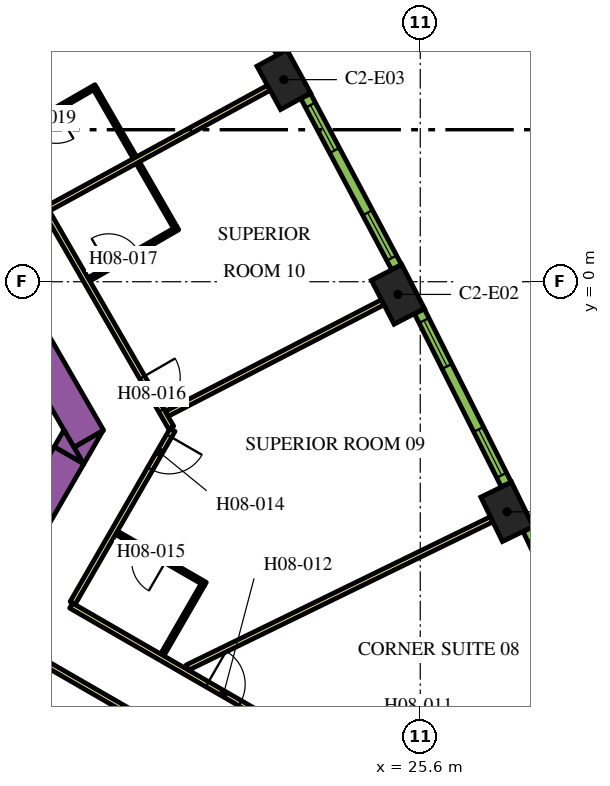
"""IFC4 building model, lengths in metres.
Left out: names, types, materials, properties, quantities, classifications, styles, units other than length and angle.
Written with IfcOpenShell. Run it as: python <this file> out.ifc"""

import sys

from ifc_helpers import new_model, si_unit, direction, frame, frame_2d, origin, origin_2d, place, context, subcontext, project, spatial, polyline, rectangle, outline, extrude, element, fill, save


model = new_model("IFC4")
c1 = context("Model", 3, precision=1e-05, world=origin(), true_north=direction((0.0, 1.0)))
c2 = subcontext(c1, "Body", "Model", "MODEL_VIEW")
j1 = project(units=[si_unit("LENGTHUNIT", "METRE"), si_unit("PLANEANGLEUNIT", "RADIAN")], contexts=[c1])
p1 = place(None, origin())
s1 = spatial("IfcSite", under=j1, at=p1, CompositionType="ELEMENT")
p2 = place(p1, origin())
s2 = spatial("IfcBuilding", under=s1, at=p2, CompositionType="ELEMENT")
p3 = place(p2, frame((0.0, 0.0, 111.0)))
s3 = spatial("IfcBuildingStorey", under=s2, at=p3, CompositionType="ELEMENT", Elevation=111.0)
for number, where, z_axis, x_axis in (
    (1, (27.883, -6.054, 0.0), (0.0, 0.0, 1.0), (-0.438, 0.899, 0.0)),
    (2, (25.012, -0.334, 0.0), (0.0, 0.0, 1.0), (-0.459, 0.888, 0.0)),
    (3, (22.009, 5.317, 0.0), (0.0, 0.0, 1.0), (-0.48, 0.877, 0.0)),
):
    element("IfcColumn", number, at=place(p3, frame(where, z_axis=z_axis, x_axis=x_axis)), inside=s3, PredefinedType="COLUMN", context=c2, shape_type="SweptSolid", body=[
        extrude(rectangle(XDim=1.3, YDim=0.9, at=origin_2d()), origin(), (0.0, 0.0, 1.0), 3.9),
    ])
p4 = place(p3, frame((6.711, 13.476, 0.0), z_axis=(0.0, 0.0, 1.0), x_axis=(0.500002723396, -0.866023831425, 0.0)))
e4 = element("IfcWall", 4, at=p4, inside=s3, PredefinedType="SOLIDWALL", context=c2, shape_type="SweptSolid", body=[
    extrude(rectangle(XDim=20.334, YDim=0.9, at=frame_2d((10.167, 0.0))), origin(), (0.0, 0.0, 1.0), 3.9),
])
p5 = place(p3, origin())
e5 = element("IfcWall", 5, at=p5, inside=s3, PredefinedType="SOLIDWALL", context=c2, shape_type="SweptSolid", body=[
    extrude(outline(polyline([(16.743, -4.8), (16.489, -4.36), (17.251, -3.92), (16.743, -4.8)])), origin(), (0.0, 0.0, 1.0), 3.9),
])
p6 = place(p3, frame((11.695, -12.644, 0.0), z_axis=(0.0, 0.0, 1.0), x_axis=(0.500010229568, 0.86601949766, 0.0)))
e6 = element("IfcWall", 6, at=p6, inside=s3, PredefinedType="SOLIDWALL", context=c2, shape_type="SweptSolid", body=[
    extrude(rectangle(XDim=9.326, YDim=0.9, at=frame_2d((4.663, 0.0))), origin(), (0.0, 0.0, 1.0), 3.9),
])
e7 = element("IfcWall", 7, at=p5, inside=s3, PredefinedType="SOLIDWALL", context=c2, shape_type="SweptSolid", body=[
    extrude(outline(polyline([(16.223, -3.9), (16.732, -4.78), (15.969, -4.34), (16.223, -3.9)])), origin(), (0.0, 0.0, 1.0), 3.9),
])
p7 = place(p3, frame((16.412, -8.523, 0.0), z_axis=(0.0, 0.0, 1.0), x_axis=(0.866025629663, -0.499999608766, 0.0)))
e8 = element("IfcWall", 8, at=p7, inside=s3, PredefinedType="PARTITIONING", context=c2, shape_type="SweptSolid", body=[
    extrude(rectangle(XDim=13.624, YDim=0.15, at=frame_2d((6.812, 0.0))), origin(), (0.0, 0.0, 1.0), 2.75),
])
p8 = place(p7, frame((4.134, 0.0, 0.0)))
e9 = element("IfcOpeningElement", 9, at=p8, cuts=e8, PredefinedType="OPENING", context=c2, shape_type="SweptSolid", body=[
    extrude(rectangle(XDim=1.0, YDim=2.1, at=frame_2d((0.5, 1.05))), frame((0.0, 0.085, 0.0), z_axis=(0.0, -1.0, 0.0), x_axis=(1.0, 0.0, 0.0)), (0.0, 0.0, 1.0), 0.17),
])
p9 = place(p3, frame((19.081, -3.9, 0.0), z_axis=(0.0, 0.0, 1.0), x_axis=(-0.499974327079, -0.866040225545, 0.0)))
e10 = element("IfcWall", 10, at=p9, inside=s3, PredefinedType="PARTITIONING", context=c2, shape_type="SweptSolid", body=[
    extrude(rectangle(XDim=5.258, YDim=0.15, at=frame_2d((2.629, 0.0))), origin(), (0.0, 0.0, 1.0), 2.75),
])
p10 = place(p9, frame((0.18, 0.0, 0.0)))
e11 = element("IfcOpeningElement", 11, at=p10, cuts=e10, PredefinedType="OPENING", context=c2, shape_type="SweptSolid", body=[
    extrude(rectangle(XDim=1.0, YDim=2.1, at=frame_2d((0.5, 1.05))), frame((0.0, 0.085, 0.0), z_axis=(0.0, -1.0, 0.0), x_axis=(1.0, 0.0, 0.0)), (0.0, 0.0, 1.0), 0.17),
])
p11 = place(p3, frame((6.163, 18.475, 0.0), z_axis=(0.0, 0.0, 1.0), x_axis=(0.500001317485, -0.866024643133, 0.0)))
e12 = element("IfcWall", 12, at=p11, inside=s3, PredefinedType="PARTITIONING", context=c2, shape_type="SweptSolid", body=[
    extrude(rectangle(XDim=25.767, YDim=0.15, at=frame_2d((12.883, 0.0))), origin(), (0.0, 0.0, 1.0), 2.75),
])
p12 = place(p11, frame((24.241, 0.0, 0.0)))
e13 = element("IfcOpeningElement", 13, at=p12, cuts=e12, PredefinedType="OPENING", context=c2, shape_type="SweptSolid", body=[
    extrude(rectangle(XDim=1.0, YDim=2.1, at=frame_2d((0.5, 1.05))), frame((0.0, 0.085, 0.0), z_axis=(0.0, -1.0, 0.0), x_axis=(1.0, 0.0, 0.0)), (0.0, 0.0, 1.0), 0.17),
])
p13 = place(p11, frame((13.144, 0.0, 0.0)))
e14 = element("IfcOpeningElement", 14, at=p13, cuts=e12, PredefinedType="OPENING", context=c2, shape_type="SweptSolid", body=[
    extrude(rectangle(XDim=1.0, YDim=2.1, at=frame_2d((0.5, 1.05))), frame((0.0, 0.085, 0.0), z_axis=(0.0, -1.0, 0.0), x_axis=(1.0, 0.0, 0.0)), (0.0, 0.0, 1.0), 0.17),
])
p14 = place(p11, frame((10.874, 0.0, 0.0)))
e15 = element("IfcOpeningElement", 15, at=p14, cuts=e12, PredefinedType="OPENING", context=c2, shape_type="SweptSolid", body=[
    extrude(rectangle(XDim=0.9, YDim=2.1, at=frame_2d((0.45, 1.05))), frame((0.0, 0.085, 0.0), z_axis=(0.0, -1.0, 0.0), x_axis=(1.0, 0.0, 0.0)), (0.0, 0.0, 1.0), 0.17),
])
p15 = place(p11, frame((3.718, 0.0, 0.0)))
e16 = element("IfcOpeningElement", 16, at=p15, cuts=e12, PredefinedType="OPENING", context=c2, shape_type="SweptSolid", body=[
    extrude(rectangle(XDim=1.0, YDim=2.1, at=frame_2d((0.5, 1.05))), frame((0.0, 0.085, 0.0), z_axis=(0.0, -1.0, 0.0), x_axis=(1.0, 0.0, 0.0)), (0.0, 0.0, 1.0), 0.17),
])
p16 = place(p11, frame((2.411, 0.0, 0.0)))
e17 = element("IfcOpeningElement", 17, at=p16, cuts=e12, PredefinedType="OPENING", context=c2, shape_type="SweptSolid", body=[
    extrude(rectangle(XDim=1.0, YDim=2.1, at=frame_2d((0.5, 1.05))), frame((0.0, 0.085, 0.0), z_axis=(0.0, -1.0, 0.0), x_axis=(1.0, 0.0, 0.0)), (0.0, 0.0, 1.0), 0.17),
])
p17 = place(p3, frame((27.386, -16.764, 0.0), z_axis=(0.0, 0.0, 1.0), x_axis=(-0.866022585856, 0.500004880763, 0.0)))
e18 = element("IfcWall", 18, at=p17, inside=s3, PredefinedType="PARTITIONING", context=c2, shape_type="SweptSolid", body=[
    extrude(rectangle(XDim=13.544, YDim=0.15, at=frame_2d((6.772, 0.0))), origin(), (0.0, 0.0, 1.0), 2.75),
])
p18 = place(p17, frame((9.447, 0.0, 0.0)))
e19 = element("IfcOpeningElement", 19, at=p18, cuts=e18, PredefinedType="OPENING", context=c2, shape_type="SweptSolid", body=[
    extrude(rectangle(XDim=1.0, YDim=2.1, at=frame_2d((0.5, 1.05))), frame((0.0, 0.085, 0.0), z_axis=(0.0, -1.0, 0.0), x_axis=(1.0, 0.0, 0.0)), (0.0, 0.0, 1.0), 0.17),
])
p19 = place(p17, frame((3.926, 0.0, 0.0)))
e20 = element("IfcOpeningElement", 20, at=p19, cuts=e18, PredefinedType="OPENING", context=c2, shape_type="SweptSolid", body=[
    extrude(rectangle(XDim=0.9, YDim=2.1, at=frame_2d((0.45, 1.05))), frame((0.0, 0.085, 0.0), z_axis=(0.0, -1.0, 0.0), x_axis=(1.0, 0.0, 0.0)), (0.0, 0.0, 1.0), 0.17),
])
p20 = place(p3, frame((21.614, 5.102, 0.0), z_axis=(0.0, 0.0, 1.0), x_axis=(-0.877484555087, -0.479604895287, 0.0)))
e21 = element("IfcWall", 21, at=p20, inside=s3, PredefinedType="PARTITIONING", context=c2, shape_type="SweptSolid", body=[
    extrude(rectangle(XDim=6.611, YDim=0.15, at=frame_2d((3.306, 0.0))), origin(), (0.0, 0.0, 1.0), 2.75),
])
p21 = place(p3, frame((24.613, -0.541, 0.0), z_axis=(0.0, 0.0, 1.0), x_axis=(-0.888459912519, -0.458954228487, 0.0)))
e22 = element("IfcWall", 22, at=p21, inside=s3, PredefinedType="PARTITIONING", context=c2, shape_type="SweptSolid", body=[
    extrude(rectangle(XDim=6.392, YDim=0.15, at=frame_2d((3.196, 0.0))), origin(), (0.0, 0.0, 1.0), 2.75),
])
p22 = place(p3, frame((27.478, -6.251, 0.0), z_axis=(0.0, 0.0, 1.0), x_axis=(-0.898940618603, -0.438070501432, 0.0)))
e23 = element("IfcWall", 23, at=p22, inside=s3, PredefinedType="PARTITIONING", context=c2, shape_type="SweptSolid", body=[
    extrude(rectangle(XDim=8.909, YDim=0.15, at=frame_2d((4.455, 0.0))), origin(), (0.0, 0.0, 1.0), 2.75),
])
p23 = place(p3, frame((19.946, -7.953, 0.0), z_axis=(0.0, 0.0, 1.0), x_axis=(-0.86599734893, 0.500048589285, 0.0)))
e24 = element("IfcWall", 24, at=p23, inside=s3, PredefinedType="PARTITIONING", context=c2, shape_type="SweptSolid", body=[
    extrude(rectangle(XDim=2.7, YDim=0.1, at=frame_2d((1.35, 0.0))), origin(), (0.0, 0.0, 1.0), 2.75),
])
p24 = place(p23, frame((1.2, 0.0, 0.0)))
e25 = element("IfcOpeningElement", 25, at=p24, cuts=e24, PredefinedType="OPENING", context=c2, shape_type="SweptSolid", body=[
    extrude(rectangle(XDim=0.9, YDim=2.1, at=frame_2d((0.45, 1.05))), frame((0.0, 0.06, 0.0), z_axis=(0.0, -1.0, 0.0), x_axis=(1.0, 0.0, 0.0)), (0.0, 0.0, 1.0), 0.12),
])
p25 = place(p3, frame((19.877, -7.972, 0.0), z_axis=(0.0, 0.0, 1.0), x_axis=(-0.500010206181, -0.866019511163, 0.0)))
e26 = element("IfcWall", 26, at=p25, inside=s3, PredefinedType="PARTITIONING", context=c2, shape_type="SweptSolid", body=[
    extrude(rectangle(XDim=2.13, YDim=0.1, at=frame_2d((1.065, 0.0))), origin(), (0.0, 0.0, 1.0), 2.75),
])
p26 = place(p3, frame((16.881, 0.061, 0.0), z_axis=(0.0, 0.0, 1.0), x_axis=(0.866019956843, 0.50000943426, 0.0)))
e27 = element("IfcWall", 27, at=p26, inside=s3, PredefinedType="PARTITIONING", context=c2, shape_type="SweptSolid", body=[
    extrude(rectangle(XDim=2.7, YDim=0.1, at=frame_2d((1.35, 0.0))), origin(), (0.0, 0.0, 1.0), 2.75),
])
p27 = place(p26, frame((0.6, 0.0, 0.0)))
e28 = element("IfcOpeningElement", 28, at=p27, cuts=e27, PredefinedType="OPENING", context=c2, shape_type="SweptSolid", body=[
    extrude(rectangle(XDim=0.9, YDim=2.1, at=frame_2d((0.45, 1.05))), frame((0.0, 0.06, 0.0), z_axis=(0.0, -1.0, 0.0), x_axis=(1.0, 0.0, 0.0)), (0.0, 0.0, 1.0), 0.12),
])
p28 = place(p3, frame((19.151, 1.429, 0.0), z_axis=(0.0, 0.0, 1.0), x_axis=(-0.500024377727, 0.866011328839, 0.0)))
e29 = element("IfcWall", 29, at=p28, inside=s3, PredefinedType="PARTITIONING", context=c2, shape_type="SweptSolid", body=[
    extrude(rectangle(XDim=1.96, YDim=0.1, at=frame_2d((0.98, 0.0))), origin(), (0.0, 0.0, 1.0), 2.75),
])
p29 = place(p3, frame((17.066, 5.141, 0.0), z_axis=(0.0, 0.0, 1.0), x_axis=(-0.866059108428, -0.4999416173, 0.0)))
e30 = element("IfcWall", 30, at=p29, inside=s3, PredefinedType="PARTITIONING", context=c2, shape_type="SweptSolid", body=[
    extrude(rectangle(XDim=2.7, YDim=0.1, at=frame_2d((1.35, 0.0))), origin(), (0.0, 0.0, 1.0), 2.75),
])
p30 = place(p29, frame((1.2, 0.0, 0.0)))
e31 = element("IfcOpeningElement", 31, at=p30, cuts=e30, PredefinedType="OPENING", context=c2, shape_type="SweptSolid", body=[
    extrude(rectangle(XDim=0.9, YDim=2.1, at=frame_2d((0.45, 1.05))), frame((0.0, 0.06, 0.0), z_axis=(0.0, -1.0, 0.0), x_axis=(1.0, 0.0, 0.0)), (0.0, 0.0, 1.0), 0.12),
])
p31 = place(p3, frame((17.047, 5.073, 0.0), z_axis=(0.0, 0.0, 1.0), x_axis=(0.500008976872, -0.866020220923, 0.0)))
e32 = element("IfcWall", 32, at=p31, inside=s3, PredefinedType="PARTITIONING", context=c2, shape_type="SweptSolid", body=[
    extrude(rectangle(XDim=2.09, YDim=0.1, at=frame_2d((1.045, 0.0))), origin(), (0.0, 0.0, 1.0), 2.75),
])
p32 = place(p3, frame((30.62, -11.127, 0.0), z_axis=(0.0, 0.0, 1.0), x_axis=(-0.427543726596, 0.903994669148, 0.0)))
e33 = element("IfcWall", 33, at=p32, inside=s3, PredefinedType="SOLIDWALL", context=c2, shape_type="SweptSolid", body=[
    extrude(rectangle(XDim=5.107, YDim=0.29, at=frame_2d((2.553, 0.0))), origin(), (0.0, 0.0, 1.0), 3.65),
])
p33 = place(p32, frame((0.24, 0.0, 0.9)))
e34 = element("IfcOpeningElement", 34, at=p33, cuts=e33, PredefinedType="OPENING", context=c2, shape_type="SweptSolid", body=[
    extrude(rectangle(XDim=1.35, YDim=2.15, at=frame_2d((0.675, 1.075))), frame((0.0, 0.155, 0.0), z_axis=(0.0, -1.0, 0.0), x_axis=(1.0, 0.0, 0.0)), (0.0, 0.0, 1.0), 0.31),
])
p34 = place(p32, frame((3.471, 0.0, 0.9)))
e35 = element("IfcOpeningElement", 35, at=p34, cuts=e33, PredefinedType="OPENING", context=c2, shape_type="SweptSolid", body=[
    extrude(rectangle(XDim=1.35, YDim=2.15, at=frame_2d((0.675, 1.075))), frame((0.0, 0.155, 0.0), z_axis=(0.0, -1.0, 0.0), x_axis=(1.0, 0.0, 0.0)), (0.0, 0.0, 1.0), 0.31),
])
p35 = place(p3, frame((27.864, -5.336, 0.0), z_axis=(0.0, 0.0, 1.0), x_axis=(-0.448534297211, 0.893765620409, 0.0)))
e36 = element("IfcWall", 36, at=p35, inside=s3, PredefinedType="SOLIDWALL", context=c2, shape_type="SweptSolid", body=[
    extrude(rectangle(XDim=5.1, YDim=0.29, at=frame_2d((2.55, 0.0))), origin(), (0.0, 0.0, 1.0), 3.65),
])
p36 = place(p35, frame((0.272, 0.0, 0.9)))
e37 = element("IfcOpeningElement", 37, at=p36, cuts=e36, PredefinedType="OPENING", context=c2, shape_type="SweptSolid", body=[
    extrude(rectangle(XDim=1.35, YDim=2.15, at=frame_2d((0.675, 1.075))), frame((0.0, 0.155, 0.0), z_axis=(0.0, -1.0, 0.0), x_axis=(1.0, 0.0, 0.0)), (0.0, 0.0, 1.0), 0.31),
])
p37 = place(p35, frame((3.478, 0.0, 0.9)))
e38 = element("IfcOpeningElement", 38, at=p37, cuts=e36, PredefinedType="OPENING", context=c2, shape_type="SweptSolid", body=[
    extrude(rectangle(XDim=1.35, YDim=2.15, at=frame_2d((0.675, 1.075))), frame((0.0, 0.155, 0.0), z_axis=(0.0, -1.0, 0.0), x_axis=(1.0, 0.0, 0.0)), (0.0, 0.0, 1.0), 0.31),
])
p38 = place(p3, frame((24.977, 0.383, 0.0), z_axis=(0.0, 0.0, 1.0), x_axis=(-0.469323203119, 0.883026461106, 0.0)))
e39 = element("IfcWall", 39, at=p38, inside=s3, PredefinedType="SOLIDWALL", context=c2, shape_type="SweptSolid", body=[
    extrude(rectangle(XDim=5.101, YDim=0.29, at=frame_2d((2.55, 0.0))), origin(), (0.0, 0.0, 1.0), 3.65),
])
p39 = place(p38, frame((0.273, 0.0, 0.9)))
e40 = element("IfcOpeningElement", 40, at=p39, cuts=e39, PredefinedType="OPENING", context=c2, shape_type="SweptSolid", body=[
    extrude(rectangle(XDim=1.35, YDim=2.15, at=frame_2d((0.675, 1.075))), frame((0.0, 0.155, 0.0), z_axis=(0.0, -1.0, 0.0), x_axis=(1.0, 0.0, 0.0)), (0.0, 0.0, 1.0), 0.31),
])
p40 = place(p38, frame((3.478, 0.0, 0.9)))
e41 = element("IfcOpeningElement", 41, at=p40, cuts=e39, PredefinedType="OPENING", context=c2, shape_type="SweptSolid", body=[
    extrude(rectangle(XDim=1.35, YDim=2.15, at=frame_2d((0.675, 1.075))), frame((0.0, 0.155, 0.0), z_axis=(0.0, -1.0, 0.0), x_axis=(1.0, 0.0, 0.0)), (0.0, 0.0, 1.0), 0.31),
])
p41 = place(p3, frame((21.956, 6.033, 0.0), z_axis=(0.0, 0.0, 1.0), x_axis=(-0.48983164787, 0.87181704316, 0.0)))
e42 = element("IfcWall", 42, at=p41, inside=s3, PredefinedType="SOLIDWALL", context=c2, shape_type="SweptSolid", body=[
    extrude(rectangle(XDim=5.1, YDim=0.29, at=frame_2d((2.55, 0.0))), origin(), (0.0, 0.0, 1.0), 3.65),
])
p42 = place(p41, frame((0.273, 0.0, 0.9)))
e43 = element("IfcOpeningElement", 43, at=p42, cuts=e42, PredefinedType="OPENING", context=c2, shape_type="SweptSolid", body=[
    extrude(rectangle(XDim=1.35, YDim=2.15, at=frame_2d((0.675, 1.075))), frame((0.0, 0.155, 0.0), z_axis=(0.0, -1.0, 0.0), x_axis=(1.0, 0.0, 0.0)), (0.0, 0.0, 1.0), 0.31),
])
p43 = place(p41, frame((3.478, 0.0, 0.9)))
e44 = element("IfcOpeningElement", 44, at=p43, cuts=e42, PredefinedType="OPENING", context=c2, shape_type="SweptSolid", body=[
    extrude(rectangle(XDim=1.35, YDim=2.15, at=frame_2d((0.675, 1.075))), frame((0.0, 0.155, 0.0), z_axis=(0.0, -1.0, 0.0), x_axis=(1.0, 0.0, 0.0)), (0.0, 0.0, 1.0), 0.31),
])
p44 = place(p8, origin())
e45 = element("IfcDoor", 45, at=p44, inside=s3, OperationType="SINGLE_SWING_LEFT", PredefinedType="DOOR", context=c2, shape_type="SweptSolid", body=[
    extrude(rectangle(XDim=1.0, YDim=2.1, at=frame_2d((0.5, 1.05))), frame((0.0, 0.025, 0.0), z_axis=(0.0, -1.0, 0.0), x_axis=(1.0, 0.0, 0.0)), (0.0, 0.0, 1.0), 0.05),
])
fill(e9, e45)
p45 = place(p10, origin())
e46 = element("IfcDoor", 46, at=p45, inside=s3, OperationType="SINGLE_SWING_LEFT", PredefinedType="DOOR", context=c2, shape_type="SweptSolid", body=[
    extrude(rectangle(XDim=1.0, YDim=2.1, at=frame_2d((0.5, 1.05))), frame((0.0, 0.025, 0.0), z_axis=(0.0, -1.0, 0.0), x_axis=(1.0, 0.0, 0.0)), (0.0, 0.0, 1.0), 0.05),
])
fill(e11, e46)
p46 = place(p24, origin())
e47 = element("IfcDoor", 47, at=p46, inside=s3, OperationType="SINGLE_SWING_RIGHT", PredefinedType="DOOR", context=c2, shape_type="SweptSolid", body=[
    extrude(rectangle(XDim=0.9, YDim=2.1, at=frame_2d((0.45, 1.05))), frame((0.0, 0.025, 0.0), z_axis=(0.0, -1.0, 0.0), x_axis=(1.0, 0.0, 0.0)), (0.0, 0.0, 1.0), 0.05),
])
fill(e25, e47)
p47 = place(p12, origin())
e48 = element("IfcDoor", 48, at=p47, inside=s3, OperationType="SINGLE_SWING_RIGHT", PredefinedType="DOOR", context=c2, shape_type="SweptSolid", body=[
    extrude(rectangle(XDim=1.0, YDim=2.1, at=frame_2d((0.5, 1.05))), frame((0.0, 0.025, 0.0), z_axis=(0.0, -1.0, 0.0), x_axis=(1.0, 0.0, 0.0)), (0.0, 0.0, 1.0), 0.05),
])
fill(e13, e48)
p48 = place(p27, origin())
e49 = element("IfcDoor", 49, at=p48, inside=s3, OperationType="SINGLE_SWING_LEFT", PredefinedType="DOOR", context=c2, shape_type="SweptSolid", body=[
    extrude(rectangle(XDim=0.9, YDim=2.1, at=frame_2d((0.45, 1.05))), frame((0.0, 0.025, 0.0), z_axis=(0.0, -1.0, 0.0), x_axis=(1.0, 0.0, 0.0)), (0.0, 0.0, 1.0), 0.05),
])
fill(e28, e49)
p49 = place(p30, origin())
e50 = element("IfcDoor", 50, at=p49, inside=s3, OperationType="SINGLE_SWING_LEFT", PredefinedType="DOOR", context=c2, shape_type="SweptSolid", body=[
    extrude(rectangle(XDim=0.9, YDim=2.1, at=frame_2d((0.45, 1.05))), frame((0.0, 0.025, 0.0), z_axis=(0.0, -1.0, 0.0), x_axis=(1.0, 0.0, 0.0)), (0.0, 0.0, 1.0), 0.05),
])
fill(e31, e50)
p50 = place(p36, origin())
e51 = element("IfcWindow", 51, at=p50, inside=s3, PartitioningType="DOUBLE_PANEL_VERTICAL", PredefinedType="WINDOW", context=c2, shape_type="SweptSolid", body=[
    extrude(rectangle(XDim=1.35, YDim=2.15, at=frame_2d((0.675, 1.075))), frame((0.0, 0.015, 0.0), z_axis=(0.0, -1.0, 0.0), x_axis=(1.0, 0.0, 0.0)), (0.0, 0.0, 1.0), 0.06),
])
fill(e37, e51)
p51 = place(p37, origin())
e52 = element("IfcWindow", 52, at=p51, inside=s3, PartitioningType="DOUBLE_PANEL_VERTICAL", PredefinedType="WINDOW", context=c2, shape_type="SweptSolid", body=[
    extrude(rectangle(XDim=1.35, YDim=2.15, at=frame_2d((0.675, 1.075))), frame((0.0, 0.015, 0.0), z_axis=(0.0, -1.0, 0.0), x_axis=(1.0, 0.0, 0.0)), (0.0, 0.0, 1.0), 0.06),
])
fill(e38, e52)
p52 = place(p39, origin())
e53 = element("IfcWindow", 53, at=p52, inside=s3, PartitioningType="DOUBLE_PANEL_VERTICAL", PredefinedType="WINDOW", context=c2, shape_type="SweptSolid", body=[
    extrude(rectangle(XDim=1.35, YDim=2.15, at=frame_2d((0.675, 1.075))), frame((0.0, 0.015, 0.0), z_axis=(0.0, -1.0, 0.0), x_axis=(1.0, 0.0, 0.0)), (0.0, 0.0, 1.0), 0.06),
])
fill(e40, e53)
p53 = place(p40, origin())
e54 = element("IfcWindow", 54, at=p53, inside=s3, PartitioningType="DOUBLE_PANEL_VERTICAL", PredefinedType="WINDOW", context=c2, shape_type="SweptSolid", body=[
    extrude(rectangle(XDim=1.35, YDim=2.15, at=frame_2d((0.675, 1.075))), frame((0.0, 0.015, 0.0), z_axis=(0.0, -1.0, 0.0), x_axis=(1.0, 0.0, 0.0)), (0.0, 0.0, 1.0), 0.06),
])
fill(e41, e54)
save(model, sys.argv[1])
